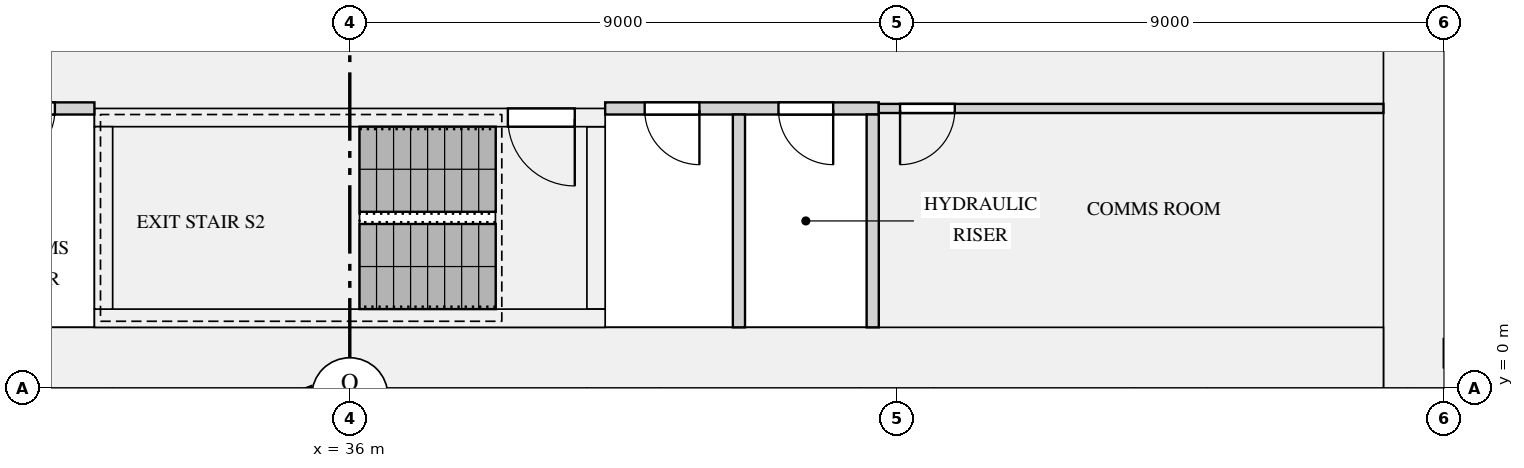
"""IFC4 building model, lengths in metres.
Left out: names, types, materials, properties, quantities, classifications, styles, units other than length and angle.
Written with IfcOpenShell. Run it as: python <this file> out.ifc"""

import sys

from ifc_helpers import new_model, si_unit, direction, frame, frame_2d, origin, place, context, subcontext, project, spatial, rectangle, extrude, element, fill, save


model = new_model("IFC4")
c1 = context("Model", 3, precision=1e-05, world=origin(), true_north=direction((0.0, 1.0)))
c2 = subcontext(c1, "Body", "Model", "MODEL_VIEW")
j1 = project(units=[si_unit("LENGTHUNIT", "METRE"), si_unit("PLANEANGLEUNIT", "RADIAN")], contexts=[c1])
p1 = place(None, origin())
s1 = spatial("IfcSite", under=j1, at=p1, CompositionType="ELEMENT")
p2 = place(p1, origin())
s2 = spatial("IfcBuilding", under=s1, at=p2, CompositionType="ELEMENT")
p3 = place(p2, frame((0.0, 0.0, 69.9)))
s3 = spatial("IfcBuildingStorey", under=s2, at=p3, CompositionType="ELEMENT", Elevation=69.9)
p4 = place(p3, frame((53.5, 0.0, 0.0), z_axis=(0.0, 0.0, 1.0), x_axis=(0.0, 1.0, 0.0)))
e1 = element("IfcWall", 1, at=p4, inside=s3, PredefinedType="SHEAR", context=c2, shape_type="SweptSolid", body=[
    extrude(rectangle(XDim=12.5, YDim=1.0, at=frame_2d((6.25, 0.0))), origin(), (0.0, 0.0, 1.0), 3.15),
])
p5 = place(p3, frame((19.0, 0.5, 0.0), z_axis=(0.0, 0.0, 1.0), x_axis=(1.0, 0.0, 0.0)))
e2 = element("IfcWall", 2, at=p5, inside=s3, PredefinedType="SHEAR", context=c2, shape_type="SweptSolid", body=[
    extrude(rectangle(XDim=34.0, YDim=1.0, at=frame_2d((17.0, 0.0))), origin(), (0.0, 0.0, 1.0), 3.15),
])
p6 = place(p3, frame((31.8, 1.15, 0.0), z_axis=(0.0, 0.0, 1.0), x_axis=(1.0, 0.0, 0.0)))
e3 = element("IfcWall", 3, at=p6, inside=s3, PredefinedType="SHEAR", context=c2, shape_type="SweptSolid", body=[
    extrude(rectangle(XDim=8.4, YDim=0.3, at=frame_2d((4.2, 0.0))), origin(), (0.0, 0.0, 1.0), 3.15),
])
p7 = place(p3, frame((31.8, 4.45, 0.0), z_axis=(0.0, 0.0, 1.0), x_axis=(1.0, 0.0, 0.0)))
e4 = element("IfcWall", 4, at=p7, inside=s3, PredefinedType="SHEAR", context=c2, shape_type="SweptSolid", body=[
    extrude(rectangle(XDim=8.4, YDim=0.3, at=frame_2d((4.2, 0.0))), origin(), (0.0, 0.0, 1.0), 3.15),
])
p8 = place(p7, frame((6.8, 0.0, 0.0)))
e5 = element("IfcOpeningElement", 5, at=p8, cuts=e4, PredefinedType="OPENING", context=c2, shape_type="SweptSolid", body=[
    extrude(rectangle(XDim=1.1, YDim=2.1, at=frame_2d((0.55, 1.05))), frame((0.0, 0.16, 0.0), z_axis=(0.0, -1.0, 0.0), x_axis=(1.0, 0.0, 0.0)), (0.0, 0.0, 1.0), 0.32),
])
for number, where, z_axis, x_axis in (
    (6, (31.95, 1.3, 0.0), (0.0, 0.0, 1.0), (0.0, 1.0, 0.0)),
    (7, (40.05, 1.3, 0.0), (0.0, 0.0, 1.0), (0.0, 1.0, 0.0)),
):
    element("IfcWall", number, at=place(p3, frame(where, z_axis=z_axis, x_axis=x_axis)), inside=s3, PredefinedType="SHEAR", context=c2, shape_type="SweptSolid", body=[
        extrude(rectangle(XDim=3.0, YDim=0.3, at=frame_2d((1.5, 0.0))), origin(), (0.0, 0.0, 1.0), 3.15),
    ])
p9 = place(p3, frame((27.3, 4.6, 0.0), z_axis=(0.0, 0.0, 1.0), x_axis=(1.0, 0.0, 0.0)))
e8 = element("IfcWall", 8, at=p9, inside=s3, PredefinedType="PARTITIONING", context=c2, shape_type="SweptSolid", body=[
    extrude(rectangle(XDim=4.5, YDim=0.2, at=frame_2d((2.25, 0.0))), origin(), (0.0, 0.0, 1.0), 2.65),
])
p10 = place(p9, frame((0.75, 0.0, 0.0)))
e9 = element("IfcOpeningElement", 9, at=p10, cuts=e8, PredefinedType="OPENING", context=c2, shape_type="SweptSolid", body=[
    extrude(rectangle(XDim=0.9, YDim=2.1, at=frame_2d((0.45, 1.05))), frame((0.0, 0.11, 0.0), z_axis=(0.0, -1.0, 0.0), x_axis=(1.0, 0.0, 0.0)), (0.0, 0.0, 1.0), 0.22),
])
p11 = place(p9, frame((2.95, 0.0, 0.0)))
e10 = element("IfcOpeningElement", 10, at=p11, cuts=e8, PredefinedType="OPENING", context=c2, shape_type="SweptSolid", body=[
    extrude(rectangle(XDim=0.9, YDim=2.1, at=frame_2d((0.45, 1.05))), frame((0.0, 0.11, 0.0), z_axis=(0.0, -1.0, 0.0), x_axis=(1.0, 0.0, 0.0)), (0.0, 0.0, 1.0), 0.22),
])
p12 = place(p3, frame((40.2, 4.6, 0.0), z_axis=(0.0, 0.0, 1.0), x_axis=(1.0, 0.0, 0.0)))
e11 = element("IfcWall", 11, at=p12, inside=s3, PredefinedType="PARTITIONING", context=c2, shape_type="SweptSolid", body=[
    extrude(rectangle(XDim=4.5, YDim=0.2, at=frame_2d((2.25, 0.0))), origin(), (0.0, 0.0, 1.0), 2.65),
])
p13 = place(p12, frame((0.65, 0.0, 0.0)))
e12 = element("IfcOpeningElement", 12, at=p13, cuts=e11, PredefinedType="OPENING", context=c2, shape_type="SweptSolid", body=[
    extrude(rectangle(XDim=0.9, YDim=2.1, at=frame_2d((0.45, 1.05))), frame((0.0, 0.11, 0.0), z_axis=(0.0, -1.0, 0.0), x_axis=(1.0, 0.0, 0.0)), (0.0, 0.0, 1.0), 0.22),
])
p14 = place(p12, frame((2.85, 0.0, 0.0)))
e13 = element("IfcOpeningElement", 13, at=p14, cuts=e11, PredefinedType="OPENING", context=c2, shape_type="SweptSolid", body=[
    extrude(rectangle(XDim=0.9, YDim=2.1, at=frame_2d((0.45, 1.05))), frame((0.0, 0.11, 0.0), z_axis=(0.0, -1.0, 0.0), x_axis=(1.0, 0.0, 0.0)), (0.0, 0.0, 1.0), 0.22),
])
p15 = place(p3, frame((44.7, 4.6, 0.0), z_axis=(0.0, 0.0, 1.0), x_axis=(1.0, 0.0, 0.0)))
e14 = element("IfcWall", 14, at=p15, inside=s3, PredefinedType="PARTITIONING", context=c2, shape_type="SweptSolid", body=[
    extrude(rectangle(XDim=8.3, YDim=0.15, at=frame_2d((4.15, 0.0))), origin(), (0.0, 0.0, 1.0), 2.65),
])
p16 = place(p15, frame((0.35, 0.0, 0.0)))
e15 = element("IfcOpeningElement", 15, at=p16, cuts=e14, PredefinedType="OPENING", context=c2, shape_type="SweptSolid", body=[
    extrude(rectangle(XDim=0.9, YDim=2.1, at=frame_2d((0.45, 1.05))), frame((0.0, 0.085, 0.0), z_axis=(0.0, -1.0, 0.0), x_axis=(1.0, 0.0, 0.0)), (0.0, 0.0, 1.0), 0.17),
])
for number, where, z_axis, x_axis in (
    (16, (42.4, 1.0, 0.0), (0.0, 0.0, 1.0), (0.0, 1.0, 0.0)),
    (17, (44.6, 1.0, 0.0), (0.0, 0.0, 1.0), (0.0, 1.0, 0.0)),
):
    element("IfcWall", number, at=place(p3, frame(where, z_axis=z_axis, x_axis=x_axis)), inside=s3, PredefinedType="PARTITIONING", context=c2, shape_type="SweptSolid", body=[
        extrude(rectangle(XDim=3.5, YDim=0.2, at=frame_2d((1.75, 0.0))), origin(), (0.0, 0.0, 1.0), 2.65),
    ])
p17 = place(p8, frame((1.1, 0.0, 0.0), z_axis=(0.0, 0.0, 1.0), x_axis=(-1.0, 0.0, 0.0)))
e18 = element("IfcDoor", 18, at=p17, inside=s3, OperationType="SINGLE_SWING_LEFT", PredefinedType="DOOR", context=c2, shape_type="SweptSolid", body=[
    extrude(rectangle(XDim=1.1, YDim=2.1, at=frame_2d((0.55, 1.05))), frame((0.0, 0.025, 0.0), z_axis=(0.0, -1.0, 0.0), x_axis=(1.0, 0.0, 0.0)), (0.0, 0.0, 1.0), 0.05),
])
fill(e5, e18)
p18 = place(p16, frame((0.9, 0.0, 0.0), z_axis=(0.0, 0.0, 1.0), x_axis=(-1.0, 0.0, 0.0)))
e19 = element("IfcDoor", 19, at=p18, inside=s3, OperationType="SINGLE_SWING_RIGHT", PredefinedType="DOOR", context=c2, shape_type="SweptSolid", body=[
    extrude(rectangle(XDim=0.9, YDim=2.1, at=frame_2d((0.45, 1.05))), frame((0.0, 0.025, 0.0), z_axis=(0.0, -1.0, 0.0), x_axis=(1.0, 0.0, 0.0)), (0.0, 0.0, 1.0), 0.05),
])
fill(e15, e19)
p19 = place(p11, frame((0.9, 0.0, 0.0), z_axis=(0.0, 0.0, 1.0), x_axis=(-1.0, 0.0, 0.0)))
e20 = element("IfcDoor", 20, at=p19, inside=s3, OperationType="SINGLE_SWING_RIGHT", PredefinedType="DOOR", context=c2, shape_type="SweptSolid", body=[
    extrude(rectangle(XDim=0.9, YDim=2.1, at=frame_2d((0.45, 1.05))), frame((0.0, 0.025, 0.0), z_axis=(0.0, -1.0, 0.0), x_axis=(1.0, 0.0, 0.0)), (0.0, 0.0, 1.0), 0.05),
])
fill(e10, e20)
p20 = place(p13, frame((0.9, 0.0, 0.0), z_axis=(0.0, 0.0, 1.0), x_axis=(-1.0, 0.0, 0.0)))
e21 = element("IfcDoor", 21, at=p20, inside=s3, OperationType="SINGLE_SWING_LEFT", PredefinedType="DOOR", context=c2, shape_type="SweptSolid", body=[
    extrude(rectangle(XDim=0.9, YDim=2.1, at=frame_2d((0.45, 1.05))), frame((0.0, 0.025, 0.0), z_axis=(0.0, -1.0, 0.0), x_axis=(1.0, 0.0, 0.0)), (0.0, 0.0, 1.0), 0.05),
])
fill(e12, e21)
p21 = place(p14, frame((0.9, 0.0, 0.0), z_axis=(0.0, 0.0, 1.0), x_axis=(-1.0, 0.0, 0.0)))
e22 = element("IfcDoor", 22, at=p21, inside=s3, OperationType="SINGLE_SWING_LEFT", PredefinedType="DOOR", context=c2, shape_type="SweptSolid", body=[
    extrude(rectangle(XDim=0.9, YDim=2.1, at=frame_2d((0.45, 1.05))), frame((0.0, 0.025, 0.0), z_axis=(0.0, -1.0, 0.0), x_axis=(1.0, 0.0, 0.0)), (0.0, 0.0, 1.0), 0.05),
])
fill(e13, e22)
save(model, sys.argv[1])
